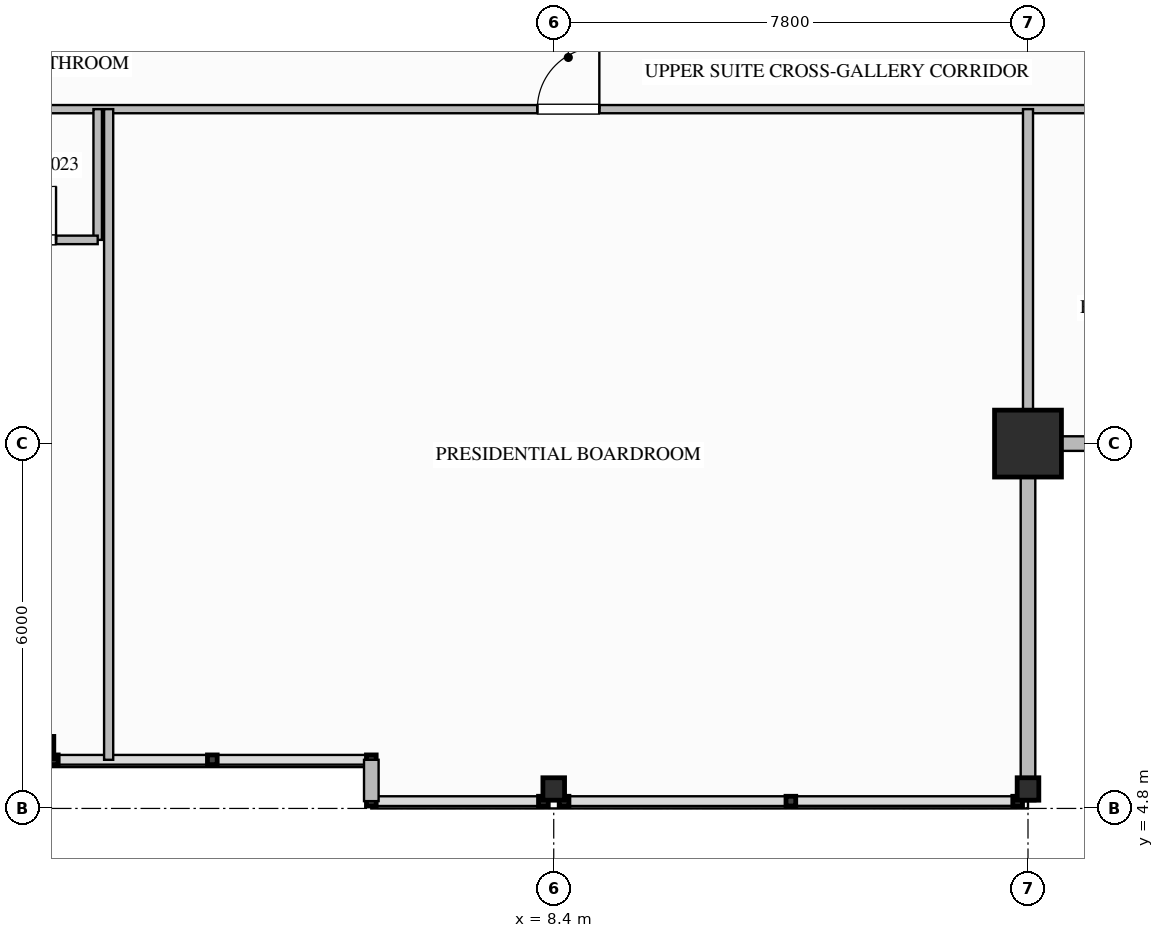
"""IFC4 building model, lengths in metres.
Left out: names, types, materials, properties, quantities, classifications, styles, units other than length and angle.
Written with IfcOpenShell. Run it as: python <this file> out.ifc"""

import sys

from ifc_helpers import new_model, si_unit, direction, frame, frame_2d, origin, origin_2d, place, context, subcontext, project, spatial, rectangle, i_section, extrude, element, fill, save


model = new_model("IFC4")
c1 = context("Model", 3, precision=1e-05, world=origin(), true_north=direction((0.0, 1.0)))
c2 = subcontext(c1, "Body", "Model", "MODEL_VIEW")
j1 = project(units=[si_unit("LENGTHUNIT", "METRE"), si_unit("PLANEANGLEUNIT", "RADIAN")], contexts=[c1])
p1 = place(None, origin())
s1 = spatial("IfcSite", under=j1, at=p1, CompositionType="ELEMENT")
p2 = place(p1, origin())
s2 = spatial("IfcBuilding", under=s1, at=p2, CompositionType="ELEMENT")
p3 = place(p2, frame((0.0, 0.0, 275.95)))
s3 = spatial("IfcBuildingStorey", under=s2, at=p3, CompositionType="ELEMENT", Elevation=275.95)
p4 = place(p3, frame((16.2, 10.8, 0.0), z_axis=(0.0, 0.0, 1.0), x_axis=(1.0, 0.0, 0.0)))
e1 = element("IfcColumn", 1, at=p4, inside=s3, PredefinedType="COLUMN", context=c2, shape_type="SweptSolid", body=[
    extrude(rectangle(XDim=1.1, YDim=1.1, at=origin_2d()), origin(), (0.0, 0.0, 1.0), 3.65),
])
for number, where, z_axis, x_axis in (
    (2, (0.0, 5.8, 0.0), (0.0, 0.0, 1.0), (0.0, 1.0, 0.0)),
    (3, (8.4, 5.12, 0.0), (0.0, 0.0, 1.0), (0.0, 1.0, 0.0)),
    (4, (16.2, 5.12, 0.0), (0.0, 0.0, 1.0), (0.0, 1.0, 0.0)),
):
    element("IfcColumn", number, at=place(p3, frame(where, z_axis=z_axis, x_axis=x_axis)), inside=s3, PredefinedType="COLUMN", context=c2, shape_type="SweptSolid", body=[
        extrude(i_section(OverallWidth=0.369, OverallDepth=0.356, WebThickness=0.011, FlangeThickness=0.018, FilletRadius=0.025, at=origin_2d()), origin(), (0.0, 0.0, 1.0), 3.647),
    ])
for number, where, z_axis, x_axis in (
    (5, (22.08, 10.8, 0.0), (0.0, 0.0, 1.0), (-1.0, 0.0, 0.0)),
    (6, (16.2, 10.8, 0.0), (0.0, 0.0, 1.0), (0.0, -1.0, 0.0)),
):
    element("IfcWall", number, at=place(p3, frame(where, z_axis=z_axis, x_axis=x_axis)), inside=s3, PredefinedType="STANDARD", context=c2, shape_type="SweptSolid", body=[
        extrude(rectangle(XDim=5.88, YDim=0.24, at=frame_2d((2.94, 0.0))), origin(), (0.0, 0.0, 1.0), 2.779),
    ])
p5 = place(p3, frame((5.4, 4.92, 0.0), z_axis=(0.0, 0.0, 1.0), x_axis=(0.0, 1.0, 0.0)))
e7 = element("IfcWall", 7, at=p5, inside=s3, PredefinedType="STANDARD", context=c2, shape_type="SweptSolid", body=[
    extrude(rectangle(XDim=0.68, YDim=0.24, at=frame_2d((0.34, 0.0))), origin(), (0.0, 0.0, 1.0), 3.39),
])
p6 = place(p3, frame((-16.2, 16.3, 0.0), z_axis=(0.0, 0.0, 1.0), x_axis=(1.0, 0.0, 0.0)))
e8 = element("IfcWall", 8, at=p6, inside=s3, PredefinedType="PARTITIONING", context=c2, shape_type="SweptSolid", body=[
    extrude(rectangle(XDim=38.28, YDim=0.135, at=frame_2d((19.14, 0.0))), origin(), (0.0, 0.0, 1.0), 3.39),
])
p7 = place(p6, frame((33.355, 0.0, 0.0)))
e9 = element("IfcOpeningElement", 9, at=p7, cuts=e8, PredefinedType="OPENING", context=c2, shape_type="SweptSolid", body=[
    extrude(rectangle(XDim=1.26, YDim=2.2, at=frame_2d((0.63, 1.1))), frame((0.0, 0.077, 0.0), z_axis=(0.0, -1.0, 0.0), x_axis=(1.0, 0.0, 0.0)), (0.0, 0.0, 1.0), 0.155),
])
p8 = place(p6, frame((6.795, 0.0, 0.0)))
e10 = element("IfcOpeningElement", 10, at=p8, cuts=e8, PredefinedType="OPENING", context=c2, shape_type="SweptSolid", body=[
    extrude(rectangle(XDim=1.26, YDim=2.2, at=frame_2d((0.63, 1.1))), frame((0.0, 0.077, 0.0), z_axis=(0.0, -1.0, 0.0), x_axis=(1.0, 0.0, 0.0)), (0.0, 0.0, 1.0), 0.155),
])
p9 = place(p6, frame((24.33, 0.0, 0.0)))
e11 = element("IfcOpeningElement", 11, at=p9, cuts=e8, PredefinedType="OPENING", context=c2, shape_type="SweptSolid", body=[
    extrude(rectangle(XDim=1.02, YDim=2.15, at=frame_2d((0.51, 1.075))), frame((0.0, 0.077, 0.0), z_axis=(0.0, -1.0, 0.0), x_axis=(1.0, 0.0, 0.0)), (0.0, 0.0, 1.0), 0.155),
])
p10 = place(p3, frame((16.2, 10.92, 0.0), z_axis=(0.0, 0.0, 1.0), x_axis=(0.0, 1.0, 0.0)))
e12 = element("IfcWall", 12, at=p10, inside=s3, PredefinedType="PARTITIONING", context=c2, shape_type="SweptSolid", body=[
    extrude(rectangle(XDim=5.38, YDim=0.165, at=frame_2d((2.69, 0.0))), origin(), (0.0, 0.0, 1.0), 2.764),
])
p11 = place(p3, frame((0.9, 16.3, 0.0), z_axis=(0.0, 0.0, 1.0), x_axis=(0.0, -1.0, 0.0)))
e13 = element("IfcWall", 13, at=p11, inside=s3, PredefinedType="PLUMBINGWALL", context=c2, shape_type="SweptSolid", body=[
    extrude(rectangle(XDim=2.15, YDim=0.14, at=frame_2d((1.075, 0.0))), origin(), (0.0, 0.0, 1.0), 3.39),
])
p12 = place(p3, frame((-1.35, 14.15, 0.0), z_axis=(0.0, 0.0, 1.0), x_axis=(1.0, 0.0, 0.0)))
e14 = element("IfcWall", 14, at=p12, inside=s3, PredefinedType="PLUMBINGWALL", context=c2, shape_type="SweptSolid", body=[
    extrude(rectangle(XDim=2.25, YDim=0.14, at=frame_2d((1.125, 0.0))), origin(), (0.0, 0.0, 1.0), 3.39),
])
p13 = place(p12, frame((0.685, 0.0, 0.0)))
e15 = element("IfcOpeningElement", 15, at=p13, cuts=e14, PredefinedType="OPENING", context=c2, shape_type="SweptSolid", body=[
    extrude(rectangle(XDim=0.88, YDim=2.1, at=frame_2d((0.44, 1.05))), frame((0.0, 0.08, 0.0), z_axis=(0.0, -1.0, 0.0), x_axis=(1.0, 0.0, 0.0)), (0.0, 0.0, 1.0), 0.16),
])
p14 = place(p3, frame((1.08, 5.6, 0.0), z_axis=(0.0, 0.0, 1.0), x_axis=(0.0, 1.0, 0.0)))
e16 = element("IfcWall", 16, at=p14, inside=s3, PredefinedType="PARTITIONING", context=c2, shape_type="SweptSolid", body=[
    extrude(rectangle(XDim=10.7, YDim=0.15, at=frame_2d((5.35, 0.0))), origin(), (0.0, 0.0, 1.0), 3.39),
])
p15 = place(p13, origin())
e17 = element("IfcDoor", 17, at=p15, inside=s3, OperationType="SINGLE_SWING_RIGHT", PredefinedType="DOOR", context=c2, shape_type="SweptSolid", body=[
    extrude(rectangle(XDim=0.88, YDim=2.1, at=frame_2d((0.44, 1.05))), frame((0.0, 0.025, 0.0), z_axis=(0.0, -1.0, 0.0), x_axis=(1.0, 0.0, 0.0)), (0.0, 0.0, 1.0), 0.05),
])
fill(e15, e17)
p16 = place(p9, origin())
e18 = element("IfcDoor", 18, at=p16, inside=s3, OperationType="SINGLE_SWING_RIGHT", PredefinedType="DOOR", context=c2, shape_type="SweptSolid", body=[
    extrude(rectangle(XDim=1.02, YDim=2.15, at=frame_2d((0.51, 1.075))), frame((0.0, 0.025, 0.0), z_axis=(0.0, -1.0, 0.0), x_axis=(1.0, 0.0, 0.0)), (0.0, 0.0, 1.0), 0.05),
])
fill(e11, e18)
save(model, sys.argv[1])
